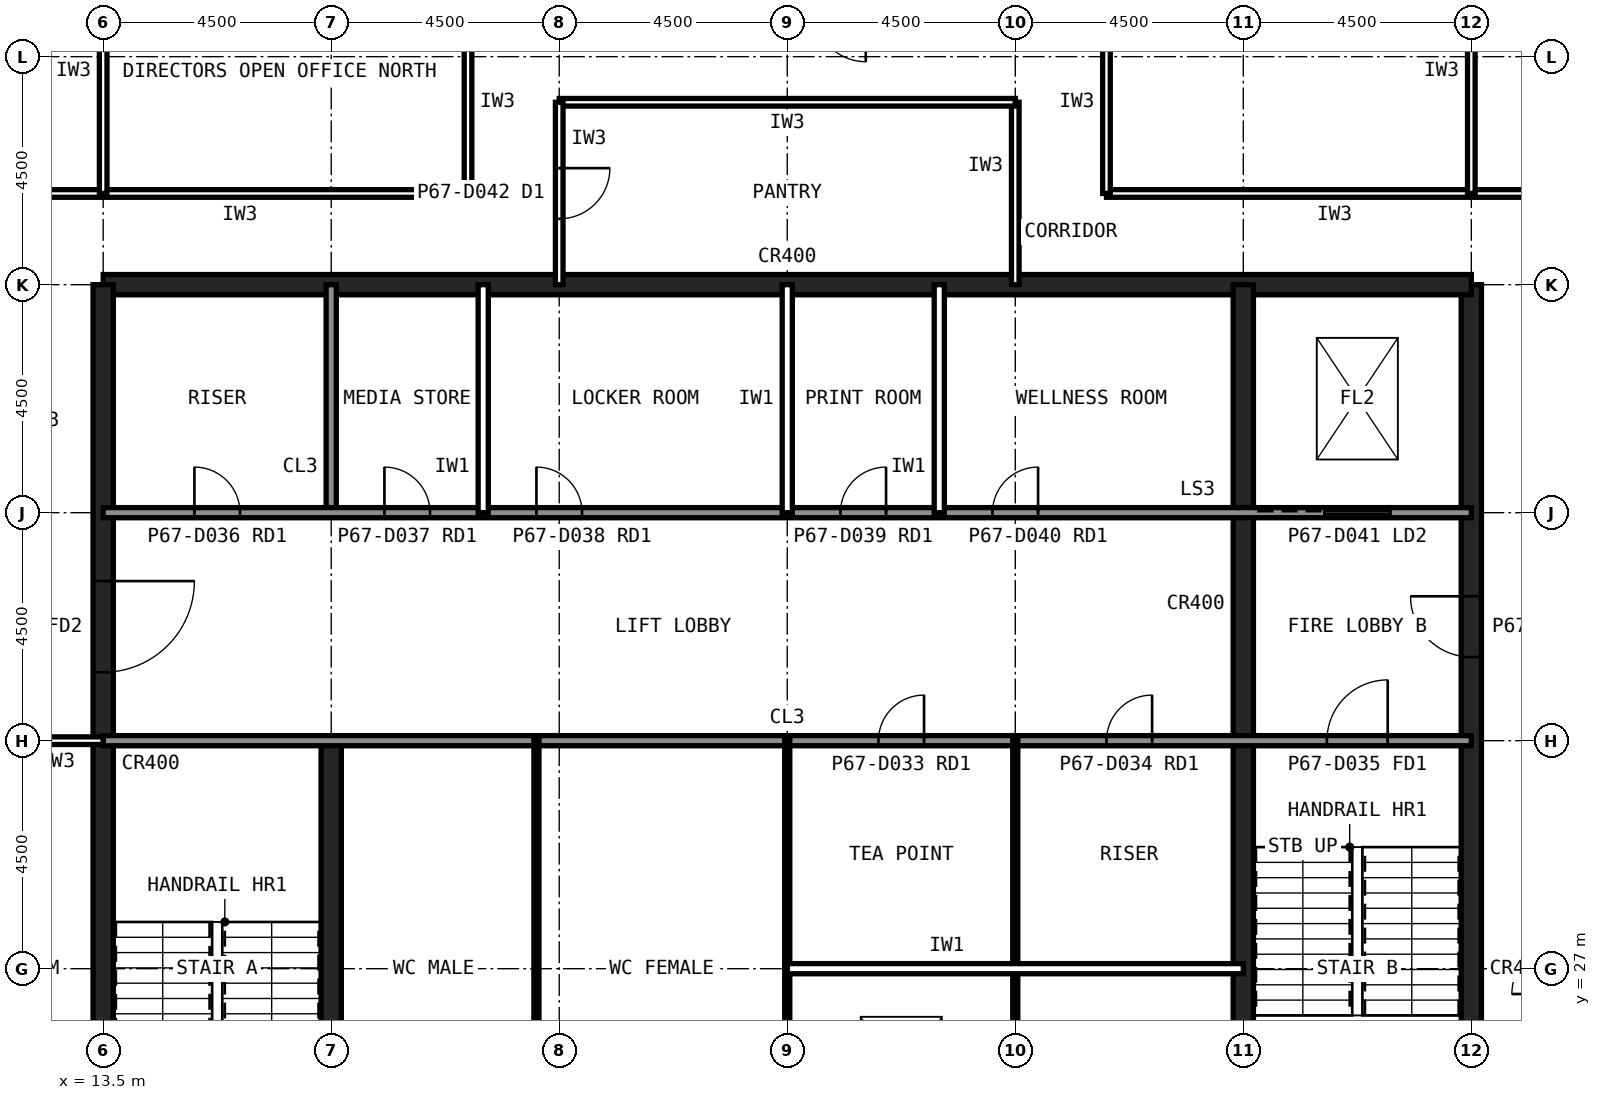
"""IFC4 building model, lengths in metres.
Left out: names, types, materials, properties, quantities, classifications, styles, units other than length and angle.
Written with IfcOpenShell. Run it as: python <this file> out.ifc"""

import sys

from ifc_helpers import new_model, si_unit, direction, frame, frame_2d, origin, place, context, subcontext, project, spatial, rectangle, extrude, element, fill, save


model = new_model("IFC4")
c1 = context("Model", 3, precision=1e-05, world=origin(), true_north=direction((0.0, 1.0)))
c2 = subcontext(c1, "Body", "Model", "MODEL_VIEW")
j1 = project(units=[si_unit("LENGTHUNIT", "METRE"), si_unit("PLANEANGLEUNIT", "RADIAN")], contexts=[c1])
p1 = place(None, origin())
s1 = spatial("IfcSite", under=j1, at=p1, CompositionType="ELEMENT")
p2 = place(p1, origin())
s2 = spatial("IfcBuilding", under=s1, at=p2, CompositionType="ELEMENT")
p3 = place(p2, frame((0.0, 0.0, 278.6)))
s3 = spatial("IfcBuildingStorey", under=s2, at=p3, CompositionType="ELEMENT", Elevation=278.6)
p4 = place(p3, frame((40.5, 13.5, 0.0), z_axis=(0.0, 0.0, 1.0), x_axis=(0.0, 1.0, 0.0)))
e1 = element("IfcWall", 1, at=p4, inside=s3, PredefinedType="SHEAR", context=c2, shape_type="SweptSolid", body=[
    extrude(rectangle(XDim=27.0, YDim=0.4, at=frame_2d((13.5, 0.0))), origin(), (0.0, 0.0, 1.0), 4.0),
])
p5 = place(p4, frame((5.85, 0.0, 0.0)))
e2 = element("IfcOpeningElement", 2, at=p5, cuts=e1, PredefinedType="OPENING", context=c2, shape_type="SweptSolid", body=[
    extrude(rectangle(XDim=1.8, YDim=2.1, at=frame_2d((0.9, 1.05))), frame((0.0, 0.21, 0.0), z_axis=(0.0, -1.0, 0.0), x_axis=(1.0, 0.0, 0.0)), (0.0, 0.0, 1.0), 0.42),
])
p6 = place(p4, frame((19.65, 0.0, 0.0)))
e3 = element("IfcOpeningElement", 3, at=p6, cuts=e1, PredefinedType="OPENING", context=c2, shape_type="SweptSolid", body=[
    extrude(rectangle(XDim=1.2, YDim=2.1, at=frame_2d((0.6, 1.05))), frame((0.0, 0.21, 0.0), z_axis=(0.0, -1.0, 0.0), x_axis=(1.0, 0.0, 0.0)), (0.0, 0.0, 1.0), 0.42),
])
p7 = place(p3, frame((40.5, 40.5, 0.0), z_axis=(0.0, 0.0, 1.0), x_axis=(-1.0, 0.0, 0.0)))
e4 = element("IfcWall", 4, at=p7, inside=s3, PredefinedType="SHEAR", context=c2, shape_type="SweptSolid", body=[
    extrude(rectangle(XDim=27.0, YDim=0.4, at=frame_2d((13.5, 0.0))), origin(), (0.0, 0.0, 1.0), 4.0),
])
p8 = place(p3, frame((13.5, 40.5, 0.0), z_axis=(0.0, 0.0, 1.0), x_axis=(0.0, -1.0, 0.0)))
e5 = element("IfcWall", 5, at=p8, inside=s3, PredefinedType="SHEAR", context=c2, shape_type="SweptSolid", body=[
    extrude(rectangle(XDim=27.0, YDim=0.4, at=frame_2d((13.5, 0.0))), origin(), (0.0, 0.0, 1.0), 4.0),
])
p9 = place(p8, frame((19.65, 0.0, 0.0)))
e6 = element("IfcOpeningElement", 6, at=p9, cuts=e5, PredefinedType="OPENING", context=c2, shape_type="SweptSolid", body=[
    extrude(rectangle(XDim=1.2, YDim=2.1, at=frame_2d((0.6, 1.05))), frame((0.0, 0.21, 0.0), z_axis=(0.0, -1.0, 0.0), x_axis=(1.0, 0.0, 0.0)), (0.0, 0.0, 1.0), 0.42),
])
p10 = place(p8, frame((5.85, 0.0, 0.0)))
e7 = element("IfcOpeningElement", 7, at=p10, cuts=e5, PredefinedType="OPENING", context=c2, shape_type="SweptSolid", body=[
    extrude(rectangle(XDim=1.8, YDim=2.1, at=frame_2d((0.9, 1.05))), frame((0.0, 0.21, 0.0), z_axis=(0.0, -1.0, 0.0), x_axis=(1.0, 0.0, 0.0)), (0.0, 0.0, 1.0), 0.42),
])
p11 = place(p3, frame((18.0, 13.5, 0.0), z_axis=(0.0, 0.0, 1.0), x_axis=(0.0, 1.0, 0.0)))
e8 = element("IfcWall", 8, at=p11, inside=s3, PredefinedType="SHEAR", context=c2, shape_type="SweptSolid", body=[
    extrude(rectangle(XDim=18.0, YDim=0.4, at=frame_2d((9.0, 0.0))), origin(), (0.0, 0.0, 1.0), 4.0),
])
p12 = place(p3, frame((18.0, 36.0, 0.0), z_axis=(0.0, 0.0, 1.0), x_axis=(0.0, 1.0, 0.0)))
e9 = element("IfcWall", 9, at=p12, inside=s3, PredefinedType="SOLIDWALL", context=c2, shape_type="SweptSolid", body=[
    extrude(rectangle(XDim=4.5, YDim=0.2, at=frame_2d((2.25, 0.0))), origin(), (0.0, 0.0, 1.0), 3.84),
])
p13 = place(p3, frame((36.0, 22.5, 0.0), z_axis=(0.0, 0.0, 1.0), x_axis=(0.0, 1.0, 0.0)))
e10 = element("IfcWall", 10, at=p13, inside=s3, PredefinedType="SHEAR", context=c2, shape_type="SweptSolid", body=[
    extrude(rectangle(XDim=18.0, YDim=0.4, at=frame_2d((9.0, 0.0))), origin(), (0.0, 0.0, 1.0), 4.0),
])
p14 = place(p3, frame((13.5, 36.0, 0.0), z_axis=(0.0, 0.0, 1.0), x_axis=(1.0, 0.0, 0.0)))
e11 = element("IfcWall", 11, at=p14, inside=s3, PredefinedType="SOLIDWALL", context=c2, shape_type="SweptSolid", body=[
    extrude(rectangle(XDim=27.0, YDim=0.2, at=frame_2d((13.5, 0.0))), origin(), (0.0, 0.0, 1.0), 3.84),
])
p15 = place(p14, frame((1.8, 0.0, 0.0)))
e12 = element("IfcOpeningElement", 12, at=p15, cuts=e11, PredefinedType="OPENING", context=c2, shape_type="SweptSolid", body=[
    extrude(rectangle(XDim=0.9, YDim=2.1, at=frame_2d((0.45, 1.05))), frame((0.0, 0.11, 0.0), z_axis=(0.0, -1.0, 0.0), x_axis=(1.0, 0.0, 0.0)), (0.0, 0.0, 1.0), 0.22),
])
p16 = place(p14, frame((5.55, 0.0, 0.0)))
e13 = element("IfcOpeningElement", 13, at=p16, cuts=e11, PredefinedType="OPENING", context=c2, shape_type="SweptSolid", body=[
    extrude(rectangle(XDim=0.9, YDim=2.1, at=frame_2d((0.45, 1.05))), frame((0.0, 0.11, 0.0), z_axis=(0.0, -1.0, 0.0), x_axis=(1.0, 0.0, 0.0)), (0.0, 0.0, 1.0), 0.22),
])
p17 = place(p14, frame((11.55, 0.0, 0.0)))
e14 = element("IfcOpeningElement", 14, at=p17, cuts=e11, PredefinedType="OPENING", context=c2, shape_type="SweptSolid", body=[
    extrude(rectangle(XDim=0.9, YDim=2.1, at=frame_2d((0.45, 1.05))), frame((0.0, 0.11, 0.0), z_axis=(0.0, -1.0, 0.0), x_axis=(1.0, 0.0, 0.0)), (0.0, 0.0, 1.0), 0.22),
])
p18 = place(p14, frame((14.55, 0.0, 0.0)))
e15 = element("IfcOpeningElement", 15, at=p18, cuts=e11, PredefinedType="OPENING", context=c2, shape_type="SweptSolid", body=[
    extrude(rectangle(XDim=0.9, YDim=2.1, at=frame_2d((0.45, 1.05))), frame((0.0, 0.11, 0.0), z_axis=(0.0, -1.0, 0.0), x_axis=(1.0, 0.0, 0.0)), (0.0, 0.0, 1.0), 0.22),
])
p19 = place(p14, frame((20.55, 0.0, 0.0)))
e16 = element("IfcOpeningElement", 16, at=p19, cuts=e11, PredefinedType="OPENING", context=c2, shape_type="SweptSolid", body=[
    extrude(rectangle(XDim=0.9, YDim=2.1, at=frame_2d((0.45, 1.05))), frame((0.0, 0.11, 0.0), z_axis=(0.0, -1.0, 0.0), x_axis=(1.0, 0.0, 0.0)), (0.0, 0.0, 1.0), 0.22),
])
p20 = place(p14, frame((24.1, 0.0, 0.0)))
e17 = element("IfcOpeningElement", 17, at=p20, cuts=e11, PredefinedType="OPENING", context=c2, shape_type="SweptSolid", body=[
    extrude(rectangle(XDim=1.3, YDim=2.2, at=frame_2d((0.65, 1.1))), frame((0.0, 0.11, 0.0), z_axis=(0.0, -1.0, 0.0), x_axis=(1.0, 0.0, 0.0)), (0.0, 0.0, 1.0), 0.22),
])
p21 = place(p3, frame((13.5, 31.5, 0.0), z_axis=(0.0, 0.0, 1.0), x_axis=(1.0, 0.0, 0.0)))
e18 = element("IfcWall", 18, at=p21, inside=s3, PredefinedType="SOLIDWALL", context=c2, shape_type="SweptSolid", body=[
    extrude(rectangle(XDim=27.0, YDim=0.2, at=frame_2d((13.5, 0.0))), origin(), (0.0, 0.0, 1.0), 3.84),
])
p22 = place(p21, frame((24.15, 0.0, 0.0)))
e19 = element("IfcOpeningElement", 19, at=p22, cuts=e18, PredefinedType="OPENING", context=c2, shape_type="SweptSolid", body=[
    extrude(rectangle(XDim=1.2, YDim=2.1, at=frame_2d((0.6, 1.05))), frame((0.0, 0.11, 0.0), z_axis=(0.0, -1.0, 0.0), x_axis=(1.0, 0.0, 0.0)), (0.0, 0.0, 1.0), 0.22),
])
p23 = place(p21, frame((15.3, 0.0, 0.0)))
e20 = element("IfcOpeningElement", 20, at=p23, cuts=e18, PredefinedType="OPENING", context=c2, shape_type="SweptSolid", body=[
    extrude(rectangle(XDim=0.9, YDim=2.1, at=frame_2d((0.45, 1.05))), frame((0.0, 0.11, 0.0), z_axis=(0.0, -1.0, 0.0), x_axis=(1.0, 0.0, 0.0)), (0.0, 0.0, 1.0), 0.22),
])
p24 = place(p21, frame((19.8, 0.0, 0.0)))
e21 = element("IfcOpeningElement", 21, at=p24, cuts=e18, PredefinedType="OPENING", context=c2, shape_type="SweptSolid", body=[
    extrude(rectangle(XDim=0.9, YDim=2.1, at=frame_2d((0.45, 1.05))), frame((0.0, 0.11, 0.0), z_axis=(0.0, -1.0, 0.0), x_axis=(1.0, 0.0, 0.0)), (0.0, 0.0, 1.0), 0.22),
])
for number, where, z_axis, x_axis in (
    (22, (24.0, 36.0, 0.0), (0.0, 0.0, 1.0), (0.0, 1.0, 0.0)),
    (23, (27.0, 36.0, 0.0), (0.0, 0.0, 1.0), (0.0, 1.0, 0.0)),
    (24, (33.0, 36.0, 0.0), (0.0, 0.0, 1.0), (0.0, 1.0, 0.0)),
):
    element("IfcWall", number, at=place(p3, frame(where, z_axis=z_axis, x_axis=x_axis)), inside=s3, PredefinedType="PARTITIONING", context=c2, shape_type="SweptSolid", body=[
        extrude(rectangle(XDim=4.5, YDim=0.2, at=frame_2d((2.25, 0.0))), origin(), (0.0, 0.0, 1.0), 3.84),
    ])
for number, where, z_axis, x_axis in (
    (25, (22.05, 22.5, 0.0), (0.0, 0.0, 1.0), (0.0, 1.0, 0.0)),
    (26, (27.0, 22.5, 0.0), (0.0, 0.0, 1.0), (0.0, 1.0, 0.0)),
    (27, (31.5, 22.5, 0.0), (0.0, 0.0, 1.0), (0.0, 1.0, 0.0)),
):
    element("IfcWall", number, at=place(p3, frame(where, z_axis=z_axis, x_axis=x_axis)), inside=s3, PredefinedType="PLUMBINGWALL", context=c2, shape_type="SweptSolid", body=[
        extrude(rectangle(XDim=9.0, YDim=0.1, at=frame_2d((4.5, 0.0))), origin(), (0.0, 0.0, 1.0), 3.84),
    ])
p25 = place(p3, frame((27.0, 27.0, 0.0), z_axis=(0.0, 0.0, 1.0), x_axis=(1.0, 0.0, 0.0)))
e28 = element("IfcWall", 28, at=p25, inside=s3, PredefinedType="PARTITIONING", context=c2, shape_type="SweptSolid", body=[
    extrude(rectangle(XDim=9.0, YDim=0.2, at=frame_2d((4.5, 0.0))), origin(), (0.0, 0.0, 1.0), 3.84),
])
for number, where, z_axis, x_axis in (
    (29, (20.7, 42.3, 0.0), (0.0, 0.0, 1.0), (-1.0, 0.0, 0.0)),
    (30, (42.3, 42.3, 0.0), (0.0, 0.0, 1.0), (-1.0, 0.0, 0.0)),
):
    element("IfcWall", number, at=place(p3, frame(where, z_axis=z_axis, x_axis=x_axis)), inside=s3, PredefinedType="PARTITIONING", context=c2, shape_type="SweptSolid", body=[
        extrude(rectangle(XDim=9.0, YDim=0.15, at=frame_2d((4.5, 0.0))), origin(), (0.0, 0.0, 1.0), 3.84),
    ])
for number, where, z_axis, x_axis in (
    (31, (20.7, 45.9, 0.0), (0.0, 0.0, 1.0), (0.0, -1.0, 0.0)),
    (32, (33.3, 42.3, 0.0), (0.0, 0.0, 1.0), (0.0, 1.0, 0.0)),
):
    element("IfcWall", number, at=place(p3, frame(where, z_axis=z_axis, x_axis=x_axis)), inside=s3, PredefinedType="PARTITIONING", context=c2, shape_type="SweptSolid", body=[
        extrude(rectangle(XDim=3.6, YDim=0.15, at=frame_2d((1.8, 0.0))), origin(), (0.0, 0.0, 1.0), 3.84),
    ])
p26 = place(p3, frame((13.5, 31.5, 0.0), z_axis=(0.0, 0.0, 1.0), x_axis=(-1.0, 0.0, 0.0)))
e33 = element("IfcWall", 33, at=p26, inside=s3, PredefinedType="PARTITIONING", context=c2, shape_type="SweptSolid", body=[
    extrude(rectangle(XDim=4.5, YDim=0.15, at=frame_2d((2.25, 0.0))), origin(), (0.0, 0.0, 1.0), 2.989),
])
p27 = place(p26, frame((1.75, 0.0, 0.0)))
e34 = element("IfcOpeningElement", 34, at=p27, cuts=e33, PredefinedType="OPENING", context=c2, shape_type="SweptSolid", body=[
    extrude(rectangle(XDim=1.0, YDim=2.1, at=frame_2d((0.5, 1.05))), frame((0.0, 0.085, 0.0), z_axis=(0.0, -1.0, 0.0), x_axis=(1.0, 0.0, 0.0)), (0.0, 0.0, 1.0), 0.17),
])
p28 = place(p3, frame((31.5, 40.5, 0.0), z_axis=(0.0, 0.0, 1.0), x_axis=(0.0, 1.0, 0.0)))
e35 = element("IfcWall", 35, at=p28, inside=s3, PredefinedType="PARTITIONING", context=c2, shape_type="SweptSolid", body=[
    extrude(rectangle(XDim=3.6, YDim=0.15, at=frame_2d((1.8, 0.0))), origin(), (0.0, 0.0, 1.0), 2.989),
])
p29 = place(p3, frame((31.5, 44.1, 0.0), z_axis=(0.0, 0.0, 1.0), x_axis=(-1.0, 0.0, 0.0)))
e36 = element("IfcWall", 36, at=p29, inside=s3, PredefinedType="PARTITIONING", context=c2, shape_type="SweptSolid", body=[
    extrude(rectangle(XDim=9.0, YDim=0.15, at=frame_2d((4.5, 0.0))), origin(), (0.0, 0.0, 1.0), 3.84),
])
p30 = place(p3, frame((22.5, 44.1, 0.0), z_axis=(0.0, 0.0, 1.0), x_axis=(0.0, -1.0, 0.0)))
e37 = element("IfcWall", 37, at=p30, inside=s3, PredefinedType="PARTITIONING", context=c2, shape_type="SweptSolid", body=[
    extrude(rectangle(XDim=3.6, YDim=0.15, at=frame_2d((1.8, 0.0))), origin(), (0.0, 0.0, 1.0), 2.989),
])
p31 = place(p30, frame((1.3, 0.0, 0.0)))
e38 = element("IfcOpeningElement", 38, at=p31, cuts=e37, PredefinedType="OPENING", context=c2, shape_type="SweptSolid", body=[
    extrude(rectangle(XDim=1.0, YDim=2.1, at=frame_2d((0.5, 1.05))), frame((0.0, 0.085, 0.0), z_axis=(0.0, -1.0, 0.0), x_axis=(1.0, 0.0, 0.0)), (0.0, 0.0, 1.0), 0.17),
])
p32 = place(p3, frame((13.5, 42.3, 0.0), z_axis=(0.0, 0.0, 1.0), x_axis=(0.0, 1.0, 0.0)))
e39 = element("IfcWall", 39, at=p32, inside=s3, PredefinedType="PARTITIONING", context=c2, shape_type="SweptSolid", body=[
    extrude(rectangle(XDim=6.88, YDim=0.15, at=frame_2d((3.44, 0.0))), origin(), (0.0, 0.0, 1.0), 2.989),
])
p33 = place(p32, frame((2.94, 0.0, 0.0)))
e40 = element("IfcOpeningElement", 40, at=p33, cuts=e39, PredefinedType="OPENING", context=c2, shape_type="SweptSolid", body=[
    extrude(rectangle(XDim=1.0, YDim=2.1, at=frame_2d((0.5, 1.05))), frame((0.0, 0.085, 0.0), z_axis=(0.0, -1.0, 0.0), x_axis=(1.0, 0.0, 0.0)), (0.0, 0.0, 1.0), 0.17),
])
p34 = place(p3, frame((40.5, 42.3, 0.0), z_axis=(0.0, 0.0, 1.0), x_axis=(0.0, 1.0, 0.0)))
e41 = element("IfcWall", 41, at=p34, inside=s3, PredefinedType="PARTITIONING", context=c2, shape_type="SweptSolid", body=[
    extrude(rectangle(XDim=6.88, YDim=0.15, at=frame_2d((3.44, 0.0))), origin(), (0.0, 0.0, 1.0), 2.989),
])
p35 = place(p34, frame((2.94, 0.0, 0.0)))
e42 = element("IfcOpeningElement", 42, at=p35, cuts=e41, PredefinedType="OPENING", context=c2, shape_type="SweptSolid", body=[
    extrude(rectangle(XDim=1.0, YDim=2.1, at=frame_2d((0.5, 1.05))), frame((0.0, 0.085, 0.0), z_axis=(0.0, -1.0, 0.0), x_axis=(1.0, 0.0, 0.0)), (0.0, 0.0, 1.0), 0.17),
])
p36 = place(p10, origin())
e43 = element("IfcDoor", 43, at=p36, inside=s3, OperationType="SINGLE_SWING_LEFT", PredefinedType="DOOR", context=c2, shape_type="SweptSolid", body=[
    extrude(rectangle(XDim=1.8, YDim=2.1, at=frame_2d((0.9, 1.05))), frame((0.0, 0.025, 0.0), z_axis=(0.0, -1.0, 0.0), x_axis=(1.0, 0.0, 0.0)), (0.0, 0.0, 1.0), 0.05),
])
fill(e7, e43)
p37 = place(p6, origin())
e44 = element("IfcDoor", 44, at=p37, inside=s3, OperationType="SINGLE_SWING_RIGHT", PredefinedType="DOOR", context=c2, shape_type="SweptSolid", body=[
    extrude(rectangle(XDim=1.2, YDim=2.1, at=frame_2d((0.6, 1.05))), frame((0.0, 0.025, 0.0), z_axis=(0.0, -1.0, 0.0), x_axis=(1.0, 0.0, 0.0)), (0.0, 0.0, 1.0), 0.05),
])
fill(e3, e44)
p38 = place(p22, origin())
e45 = element("IfcDoor", 45, at=p38, inside=s3, OperationType="SINGLE_SWING_RIGHT", PredefinedType="DOOR", context=c2, shape_type="SweptSolid", body=[
    extrude(rectangle(XDim=1.2, YDim=2.1, at=frame_2d((0.6, 1.05))), frame((0.0, 0.025, 0.0), z_axis=(0.0, -1.0, 0.0), x_axis=(1.0, 0.0, 0.0)), (0.0, 0.0, 1.0), 0.05),
])
fill(e19, e45)
p39 = place(p23, origin())
e46 = element("IfcDoor", 46, at=p39, inside=s3, OperationType="SINGLE_SWING_RIGHT", PredefinedType="DOOR", context=c2, shape_type="SweptSolid", body=[
    extrude(rectangle(XDim=0.9, YDim=2.1, at=frame_2d((0.45, 1.05))), frame((0.0, 0.025, 0.0), z_axis=(0.0, -1.0, 0.0), x_axis=(1.0, 0.0, 0.0)), (0.0, 0.0, 1.0), 0.05),
])
fill(e20, e46)
p40 = place(p24, origin())
e47 = element("IfcDoor", 47, at=p40, inside=s3, OperationType="SINGLE_SWING_RIGHT", PredefinedType="DOOR", context=c2, shape_type="SweptSolid", body=[
    extrude(rectangle(XDim=0.9, YDim=2.1, at=frame_2d((0.45, 1.05))), frame((0.0, 0.025, 0.0), z_axis=(0.0, -1.0, 0.0), x_axis=(1.0, 0.0, 0.0)), (0.0, 0.0, 1.0), 0.05),
])
fill(e21, e47)
p41 = place(p15, origin())
e48 = element("IfcDoor", 48, at=p41, inside=s3, OperationType="SINGLE_SWING_LEFT", PredefinedType="DOOR", context=c2, shape_type="SweptSolid", body=[
    extrude(rectangle(XDim=0.9, YDim=2.1, at=frame_2d((0.45, 1.05))), frame((0.0, 0.025, 0.0), z_axis=(0.0, -1.0, 0.0), x_axis=(1.0, 0.0, 0.0)), (0.0, 0.0, 1.0), 0.05),
])
fill(e12, e48)
p42 = place(p16, origin())
e49 = element("IfcDoor", 49, at=p42, inside=s3, OperationType="SINGLE_SWING_LEFT", PredefinedType="DOOR", context=c2, shape_type="SweptSolid", body=[
    extrude(rectangle(XDim=0.9, YDim=2.1, at=frame_2d((0.45, 1.05))), frame((0.0, 0.025, 0.0), z_axis=(0.0, -1.0, 0.0), x_axis=(1.0, 0.0, 0.0)), (0.0, 0.0, 1.0), 0.05),
])
fill(e13, e49)
p43 = place(p17, origin())
e50 = element("IfcDoor", 50, at=p43, inside=s3, OperationType="SINGLE_SWING_LEFT", PredefinedType="DOOR", context=c2, shape_type="SweptSolid", body=[
    extrude(rectangle(XDim=0.9, YDim=2.1, at=frame_2d((0.45, 1.05))), frame((0.0, 0.025, 0.0), z_axis=(0.0, -1.0, 0.0), x_axis=(1.0, 0.0, 0.0)), (0.0, 0.0, 1.0), 0.05),
])
fill(e14, e50)
p44 = place(p18, origin())
e51 = element("IfcDoor", 51, at=p44, inside=s3, OperationType="SINGLE_SWING_RIGHT", PredefinedType="DOOR", context=c2, shape_type="SweptSolid", body=[
    extrude(rectangle(XDim=0.9, YDim=2.1, at=frame_2d((0.45, 1.05))), frame((0.0, 0.025, 0.0), z_axis=(0.0, -1.0, 0.0), x_axis=(1.0, 0.0, 0.0)), (0.0, 0.0, 1.0), 0.05),
])
fill(e15, e51)
p45 = place(p19, origin())
e52 = element("IfcDoor", 52, at=p45, inside=s3, OperationType="SINGLE_SWING_RIGHT", PredefinedType="DOOR", context=c2, shape_type="SweptSolid", body=[
    extrude(rectangle(XDim=0.9, YDim=2.1, at=frame_2d((0.45, 1.05))), frame((0.0, 0.025, 0.0), z_axis=(0.0, -1.0, 0.0), x_axis=(1.0, 0.0, 0.0)), (0.0, 0.0, 1.0), 0.05),
])
fill(e16, e52)
p46 = place(p20, origin())
e53 = element("IfcDoor", 53, at=p46, inside=s3, OperationType="SLIDING_TO_LEFT", PredefinedType="DOOR", context=c2, shape_type="SweptSolid", body=[
    extrude(rectangle(XDim=1.3, YDim=2.2, at=frame_2d((0.65, 1.1))), frame((0.0, 0.025, 0.0), z_axis=(0.0, -1.0, 0.0), x_axis=(1.0, 0.0, 0.0)), (0.0, 0.0, 1.0), 0.05),
])
fill(e17, e53)
p47 = place(p31, origin())
e54 = element("IfcDoor", 54, at=p47, inside=s3, OperationType="SINGLE_SWING_LEFT", PredefinedType="DOOR", context=c2, shape_type="SweptSolid", body=[
    extrude(rectangle(XDim=1.0, YDim=2.1, at=frame_2d((0.5, 1.05))), frame((0.0, 0.025, 0.0), z_axis=(0.0, -1.0, 0.0), x_axis=(1.0, 0.0, 0.0)), (0.0, 0.0, 1.0), 0.05),
])
fill(e38, e54)
save(model, sys.argv[1])
